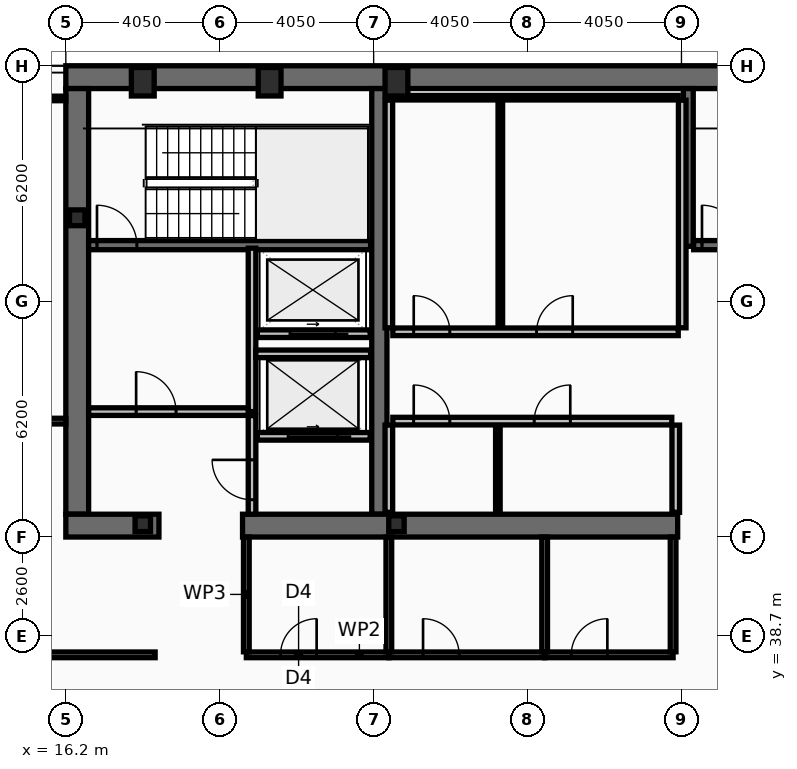
"""IFC4 building model, lengths in metres.
Left out: names, types, materials, properties, quantities, classifications, styles, units other than length and angle.
Written with IfcOpenShell. Run it as: python <this file> out.ifc"""

import sys

from ifc_helpers import new_model, si_unit, direction, frame, frame_2d, origin, origin_2d, place, context, subcontext, project, spatial, rectangle, hollow_rectangle, i_section, extrude, element, fill, save


model = new_model("IFC4")
c1 = context("Model", 3, precision=1e-05, world=origin(), true_north=direction((0.0, 1.0)))
c2 = subcontext(c1, "Body", "Model", "MODEL_VIEW")
j1 = project(units=[si_unit("LENGTHUNIT", "METRE"), si_unit("PLANEANGLEUNIT", "RADIAN")], contexts=[c1])
p1 = place(None, origin())
s1 = spatial("IfcSite", under=j1, at=p1, CompositionType="ELEMENT")
p2 = place(p1, origin())
s2 = spatial("IfcBuilding", under=s1, at=p2, CompositionType="ELEMENT")
p3 = place(p2, frame((0.0, 0.0, 203.0)))
s3 = spatial("IfcBuildingStorey", under=s2, at=p3, CompositionType="ELEMENT", Elevation=203.0)
p4 = place(p3, frame((16.2, 53.4, 0.0), z_axis=(0.0, 0.0, 1.0), x_axis=(1.0, 0.0, 0.0)))
e1 = element("IfcWall", 1, at=p4, inside=s3, PredefinedType="SHEAR", context=c2, shape_type="SweptSolid", body=[
    extrude(rectangle(XDim=40.5, YDim=0.6, at=frame_2d((20.25, 0.0))), origin(), (0.0, 0.0, 1.0), 3.44),
])
p5 = place(p3, frame((16.5, 41.9, 0.0), z_axis=(0.0, 0.0, 1.0), x_axis=(0.0, 1.0, 0.0)))
e2 = element("IfcWall", 2, at=p5, inside=s3, PredefinedType="SHEAR", context=c2, shape_type="SweptSolid", body=[
    extrude(rectangle(XDim=11.2, YDim=0.6, at=frame_2d((5.6, 0.0))), origin(), (0.0, 0.0, 1.0), 3.44),
])
p6 = place(p3, frame((24.45, 41.9, 0.0), z_axis=(0.0, 0.0, 1.0), x_axis=(0.0, 1.0, 0.0)))
e3 = element("IfcWall", 3, at=p6, inside=s3, PredefinedType="SHEAR", context=c2, shape_type="SweptSolid", body=[
    extrude(rectangle(XDim=11.2, YDim=0.4, at=frame_2d((5.6, 0.0))), origin(), (0.0, 0.0, 1.0), 3.44),
])
p7 = place(p3, frame((18.65, 41.6, 0.0), z_axis=(0.0, 0.0, 1.0), x_axis=(-1.0, 0.0, 0.0)))
e4 = element("IfcWall", 4, at=p7, inside=s3, PredefinedType="SHEAR", context=c2, shape_type="SweptSolid", body=[
    extrude(rectangle(XDim=2.45, YDim=0.6, at=frame_2d((1.225, 0.0))), origin(), (0.0, 0.0, 1.0), 3.44),
])
p8 = place(p3, frame((32.3, 41.6, 0.0), z_axis=(0.0, 0.0, 1.0), x_axis=(-1.0, 0.0, 0.0)))
e5 = element("IfcWall", 5, at=p8, inside=s3, PredefinedType="SHEAR", context=c2, shape_type="SweptSolid", body=[
    extrude(rectangle(XDim=11.45, YDim=0.6, at=frame_2d((5.725, 0.0))), origin(), (0.0, 0.0, 1.0), 3.44),
])
p9 = place(p3, frame((32.58, 48.95, 0.0), z_axis=(0.0, 0.0, 1.0), x_axis=(0.0, 1.0, 0.0)))
e6 = element("IfcWall", 6, at=p9, inside=s3, PredefinedType="SHEAR", context=c2, shape_type="SweptSolid", body=[
    extrude(rectangle(XDim=4.15, YDim=0.26, at=frame_2d((2.075, 0.0))), origin(), (0.0, 0.0, 1.0), 3.44),
])
p10 = place(p3, frame((16.8, 48.98, 0.0), z_axis=(0.0, 0.0, 1.0), x_axis=(1.0, 0.0, 0.0)))
e7 = element("IfcWall", 7, at=p10, inside=s3, PredefinedType="SHEAR", context=c2, shape_type="SweptSolid", body=[
    extrude(rectangle(XDim=7.42, YDim=0.24, at=frame_2d((3.71, 0.0))), origin(), (0.0, 0.0, 1.0), 3.44),
])
p11 = place(p10, frame((0.22, 0.0, 0.0)))
e8 = element("IfcOpeningElement", 8, at=p11, cuts=e7, PredefinedType="OPENING", context=c2, shape_type="SweptSolid", body=[
    extrude(rectangle(XDim=1.05, YDim=2.15, at=frame_2d((0.525, 1.075))), frame((0.0, 0.13, 0.0), z_axis=(0.0, -1.0, 0.0), x_axis=(1.0, 0.0, 0.0)), (0.0, 0.0, 1.0), 0.26),
])
p12 = place(p3, frame((32.72, 48.98, 0.0), z_axis=(0.0, 0.0, 1.0), x_axis=(1.0, 0.0, 0.0)))
e9 = element("IfcWall", 9, at=p12, inside=s3, PredefinedType="SHEAR", context=c2, shape_type="SweptSolid", body=[
    extrude(rectangle(XDim=7.56, YDim=0.24, at=frame_2d((3.78, 0.0))), origin(), (0.0, 0.0, 1.0), 3.44),
])
p13 = place(p12, frame((0.22, 0.0, 0.0)))
e10 = element("IfcOpeningElement", 10, at=p13, cuts=e9, PredefinedType="OPENING", context=c2, shape_type="SweptSolid", body=[
    extrude(rectangle(XDim=1.05, YDim=2.15, at=frame_2d((0.525, 1.075))), frame((0.0, 0.13, 0.0), z_axis=(0.0, -1.0, 0.0), x_axis=(1.0, 0.0, 0.0)), (0.0, 0.0, 1.0), 0.26),
])
for number, where, z_axis, x_axis in (
    (11, (18.225, 53.28, 0.0), (0.0, 0.0, 1.0), (1.0, 0.0, 0.0)),
    (12, (21.562, 53.28, 0.0), (0.0, 0.0, 1.0), (1.0, 0.0, 0.0)),
    (13, (24.9, 53.28, 0.0), (0.0, 0.0, 1.0), (1.0, 0.0, 0.0)),
):
    element("IfcColumn", number, at=place(p3, frame(where, z_axis=z_axis, x_axis=x_axis)), inside=s3, PredefinedType="COLUMN", context=c2, shape_type="SweptSolid", body=[
        extrude(hollow_rectangle(XDim=0.6, YDim=0.75, WallThickness=0.045, at=origin_2d()), origin(), (0.0, 0.0, 1.0), 3.6),
    ])
for number, where, z_axis, x_axis in (
    (14, (16.5, 49.7, 0.0), (0.0, 0.0, 1.0), (1.0, 0.0, 0.0)),
    (15, (18.225, 41.65, 0.0), (0.0, 0.0, 1.0), (1.0, 0.0, 0.0)),
    (16, (24.9, 41.65, 0.0), (0.0, 0.0, 1.0), (1.0, 0.0, 0.0)),
):
    element("IfcColumn", number, at=place(p3, frame(where, z_axis=z_axis, x_axis=x_axis)), inside=s3, PredefinedType="COLUMN", context=c2, shape_type="SweptSolid", body=[
        extrude(i_section(OverallWidth=0.406, OverallDepth=0.416, WebThickness=0.03, FlangeThickness=0.048, at=origin_2d()), origin(), (0.0, 0.0, 1.0), 3.6),
    ])
p14 = place(p3, frame((24.21, 43.95, 0.0), z_axis=(0.0, 0.0, 1.0), x_axis=(-1.0, 0.0, 0.0)))
e17 = element("IfcWall", 17, at=p14, inside=s3, PredefinedType="PARTITIONING", context=c2, shape_type="SweptSolid", body=[
    extrude(rectangle(XDim=2.97, YDim=0.2, at=frame_2d((1.485, 0.0))), origin(), (0.0, 0.0, 1.0), 3.44),
])
p15 = place(p14, frame((0.86, 0.0, 0.0)))
e18 = element("IfcOpeningElement", 18, at=p15, cuts=e17, PredefinedType="OPENING", context=c2, shape_type="SweptSolid", body=[
    extrude(rectangle(XDim=1.3, YDim=2.18, at=frame_2d((0.65, 1.09))), frame((0.0, 0.11, 0.0), z_axis=(0.0, -1.0, 0.0), x_axis=(1.0, 0.0, 0.0)), (0.0, 0.0, 1.0), 0.22),
])
p16 = place(p3, frame((24.21, 46.65, 0.0), z_axis=(0.0, 0.0, 1.0), x_axis=(-1.0, 0.0, 0.0)))
e19 = element("IfcWall", 19, at=p16, inside=s3, PredefinedType="PARTITIONING", context=c2, shape_type="SweptSolid", body=[
    extrude(rectangle(XDim=2.97, YDim=0.2, at=frame_2d((1.485, 0.0))), origin(), (0.0, 0.0, 1.0), 3.44),
])
p17 = place(p16, frame((0.91, 0.0, 0.0)))
e20 = element("IfcOpeningElement", 20, at=p17, cuts=e19, PredefinedType="OPENING", context=c2, shape_type="SweptSolid", body=[
    extrude(rectangle(XDim=1.2, YDim=2.18, at=frame_2d((0.6, 1.09))), frame((0.0, 0.11, 0.0), z_axis=(0.0, -1.0, 0.0), x_axis=(1.0, 0.0, 0.0)), (0.0, 0.0, 1.0), 0.22),
])
p18 = place(p3, frame((21.1, 44.6, 0.0), z_axis=(0.0, 0.0, 1.0), x_axis=(0.0, 1.0, 0.0)))
e21 = element("IfcWall", 21, at=p18, inside=s3, PredefinedType="PARTITIONING", context=c2, shape_type="SweptSolid", body=[
    extrude(rectangle(XDim=4.3, YDim=0.2, at=frame_2d((2.15, 0.0))), origin(), (0.0, 0.0, 1.0), 3.44),
])
p19 = place(p3, frame((16.8, 44.6, 0.0), z_axis=(0.0, 0.0, 1.0), x_axis=(1.0, 0.0, 0.0)))
e22 = element("IfcWall", 22, at=p19, inside=s3, PredefinedType="PARTITIONING", context=c2, shape_type="SweptSolid", body=[
    extrude(rectangle(XDim=4.2, YDim=0.2, at=frame_2d((2.1, 0.0))), origin(), (0.0, 0.0, 1.0), 3.44),
])
p20 = place(p19, frame((1.25, 0.0, 0.0)))
e23 = element("IfcOpeningElement", 23, at=p20, cuts=e22, PredefinedType="OPENING", context=c2, shape_type="SweptSolid", body=[
    extrude(rectangle(XDim=1.05, YDim=2.15, at=frame_2d((0.525, 1.075))), frame((0.0, 0.11, 0.0), z_axis=(0.0, -1.0, 0.0), x_axis=(1.0, 0.0, 0.0)), (0.0, 0.0, 1.0), 0.22),
])
p21 = place(p3, frame((21.2, 46.12, 0.0), z_axis=(0.0, 0.0, 1.0), x_axis=(1.0, 0.0, 0.0)))
e24 = element("IfcWall", 24, at=p21, inside=s3, PredefinedType="PARTITIONING", context=c2, shape_type="SweptSolid", body=[
    extrude(rectangle(XDim=3.02, YDim=0.2, at=frame_2d((1.51, 0.0))), origin(), (0.0, 0.0, 1.0), 3.44),
])
p22 = place(p3, frame((21.1, 41.9, 0.0), z_axis=(0.0, 0.0, 1.0), x_axis=(0.0, 1.0, 0.0)))
e25 = element("IfcWall", 25, at=p22, inside=s3, PredefinedType="PARTITIONING", context=c2, shape_type="SweptSolid", body=[
    extrude(rectangle(XDim=2.595, YDim=0.2, at=frame_2d((1.298, 0.0))), origin(), (0.0, 0.0, 1.0), 3.44),
])
p23 = place(p22, frame((0.38, 0.0, 0.0)))
e26 = element("IfcOpeningElement", 26, at=p23, cuts=e25, PredefinedType="OPENING", context=c2, shape_type="SweptSolid", body=[
    extrude(rectangle(XDim=1.05, YDim=2.15, at=frame_2d((0.525, 1.075))), frame((0.0, 0.11, 0.0), z_axis=(0.0, -1.0, 0.0), x_axis=(1.0, 0.0, 0.0)), (0.0, 0.0, 1.0), 0.22),
])
for number, where, z_axis, x_axis in (
    (27, (24.7, 46.805, 0.0), (0.0, 0.0, 1.0), (0.0, 1.0, 0.0)),
    (28, (32.42, 46.805, 0.0), (0.0, 0.0, 1.0), (0.0, 1.0, 0.0)),
):
    element("IfcWall", number, at=place(p3, frame(where, z_axis=z_axis, x_axis=x_axis)), inside=s3, PredefinedType="PARTITIONING", context=c2, shape_type="SweptSolid", body=[
        extrude(rectangle(XDim=5.99, YDim=0.2, at=frame_2d((2.995, 0.0))), origin(), (0.0, 0.0, 1.0), 3.44),
    ])
p24 = place(p3, frame((24.805, 52.86, 0.0), z_axis=(0.0, 0.0, 1.0), x_axis=(1.0, 0.0, 0.0)))
e29 = element("IfcWall", 29, at=p24, inside=s3, PredefinedType="PARTITIONING", context=c2, shape_type="SweptSolid", body=[
    extrude(rectangle(XDim=7.51, YDim=0.12, at=frame_2d((3.755, 0.0))), origin(), (0.0, 0.0, 1.0), 3.44),
])
p25 = place(p3, frame((27.634, 46.805, 0.0), z_axis=(0.0, 0.0, 1.0), x_axis=(0.0, 1.0, 0.0)))
e30 = element("IfcWall", 30, at=p25, inside=s3, PredefinedType="PARTITIONING", context=c2, shape_type="SweptSolid", body=[
    extrude(rectangle(XDim=5.99, YDim=0.12, at=frame_2d((2.995, 0.0))), origin(), (0.0, 0.0, 1.0), 3.44),
])
p26 = place(p3, frame((24.805, 46.7, 0.0), z_axis=(0.0, 0.0, 1.0), x_axis=(1.0, 0.0, 0.0)))
e31 = element("IfcWall", 31, at=p26, inside=s3, PredefinedType="PARTITIONING", context=c2, shape_type="SweptSolid", body=[
    extrude(rectangle(XDim=7.51, YDim=0.2, at=frame_2d((3.755, 0.0))), origin(), (0.0, 0.0, 1.0), 3.44),
])
p27 = place(p26, frame((0.55, 0.0, 0.0)))
e32 = element("IfcOpeningElement", 32, at=p27, cuts=e31, PredefinedType="OPENING", context=c2, shape_type="SweptSolid", body=[
    extrude(rectangle(XDim=0.95, YDim=2.1, at=frame_2d((0.475, 1.05))), frame((0.0, 0.11, 0.0), z_axis=(0.0, -1.0, 0.0), x_axis=(1.0, 0.0, 0.0)), (0.0, 0.0, 1.0), 0.22),
])
p28 = place(p26, frame((3.784, 0.0, 0.0)))
e33 = element("IfcOpeningElement", 33, at=p28, cuts=e31, PredefinedType="OPENING", context=c2, shape_type="SweptSolid", body=[
    extrude(rectangle(XDim=0.95, YDim=2.1, at=frame_2d((0.475, 1.05))), frame((0.0, 0.11, 0.0), z_axis=(0.0, -1.0, 0.0), x_axis=(1.0, 0.0, 0.0)), (0.0, 0.0, 1.0), 0.22),
])
for number, where, z_axis, x_axis in (
    (34, (24.7, 41.95, 0.0), (0.0, 0.0, 1.0), (0.0, 1.0, 0.0)),
    (35, (32.25, 41.95, 0.0), (0.0, 0.0, 1.0), (0.0, 1.0, 0.0)),
):
    element("IfcWall", number, at=place(p3, frame(where, z_axis=z_axis, x_axis=x_axis)), inside=s3, PredefinedType="PARTITIONING", context=c2, shape_type="SweptSolid", body=[
        extrude(rectangle(XDim=2.295, YDim=0.2, at=frame_2d((1.147, 0.0))), origin(), (0.0, 0.0, 1.0), 3.44),
    ])
p29 = place(p3, frame((27.569, 41.95, 0.0), z_axis=(0.0, 0.0, 1.0), x_axis=(0.0, 1.0, 0.0)))
e36 = element("IfcWall", 36, at=p29, inside=s3, PredefinedType="PARTITIONING", context=c2, shape_type="SweptSolid", body=[
    extrude(rectangle(XDim=2.295, YDim=0.12, at=frame_2d((1.147, 0.0))), origin(), (0.0, 0.0, 1.0), 3.44),
])
p30 = place(p3, frame((24.805, 44.35, 0.0), z_axis=(0.0, 0.0, 1.0), x_axis=(1.0, 0.0, 0.0)))
e37 = element("IfcWall", 37, at=p30, inside=s3, PredefinedType="PARTITIONING", context=c2, shape_type="SweptSolid", body=[
    extrude(rectangle(XDim=7.34, YDim=0.2, at=frame_2d((3.67, 0.0))), origin(), (0.0, 0.0, 1.0), 3.44),
])
p31 = place(p30, frame((0.55, 0.0, 0.0)))
e38 = element("IfcOpeningElement", 38, at=p31, cuts=e37, PredefinedType="OPENING", context=c2, shape_type="SweptSolid", body=[
    extrude(rectangle(XDim=0.95, YDim=2.1, at=frame_2d((0.475, 1.05))), frame((0.0, 0.11, 0.0), z_axis=(0.0, -1.0, 0.0), x_axis=(1.0, 0.0, 0.0)), (0.0, 0.0, 1.0), 0.22),
])
p32 = place(p30, frame((3.719, 0.0, 0.0)))
e39 = element("IfcOpeningElement", 39, at=p32, cuts=e37, PredefinedType="OPENING", context=c2, shape_type="SweptSolid", body=[
    extrude(rectangle(XDim=0.95, YDim=2.1, at=frame_2d((0.475, 1.05))), frame((0.0, 0.11, 0.0), z_axis=(0.0, -1.0, 0.0), x_axis=(1.0, 0.0, 0.0)), (0.0, 0.0, 1.0), 0.22),
])
p33 = place(p3, frame((20.95, 38.2, 0.0), z_axis=(0.0, 0.0, 1.0), x_axis=(1.0, 0.0, 0.0)))
e40 = element("IfcWall", 40, at=p33, inside=s3, PredefinedType="PARTITIONING", context=c2, shape_type="SweptSolid", body=[
    extrude(rectangle(XDim=3.75, YDim=0.15, at=frame_2d((1.875, 0.0))), origin(), (0.0, 0.0, 1.0), 2.73),
])
p34 = place(p33, frame((0.9, 0.0, 0.0)))
e41 = element("IfcOpeningElement", 41, at=p34, cuts=e40, PredefinedType="OPENING", context=c2, shape_type="SweptSolid", body=[
    extrude(rectangle(XDim=0.95, YDim=2.05, at=frame_2d((0.475, 1.025))), frame((0.0, 0.085, 0.0), z_axis=(0.0, -1.0, 0.0), x_axis=(1.0, 0.0, 0.0)), (0.0, 0.0, 1.0), 0.17),
])
p35 = place(p3, frame((24.7, 38.2, 0.0), z_axis=(0.0, 0.0, 1.0), x_axis=(1.0, 0.0, 0.0)))
e42 = element("IfcWall", 42, at=p35, inside=s3, PredefinedType="PARTITIONING", context=c2, shape_type="SweptSolid", body=[
    extrude(rectangle(XDim=4.1, YDim=0.15, at=frame_2d((2.05, 0.0))), origin(), (0.0, 0.0, 1.0), 2.73),
])
p36 = place(p35, frame((0.9, 0.0, 0.0)))
e43 = element("IfcOpeningElement", 43, at=p36, cuts=e42, PredefinedType="OPENING", context=c2, shape_type="SweptSolid", body=[
    extrude(rectangle(XDim=0.95, YDim=2.05, at=frame_2d((0.475, 1.025))), frame((0.0, 0.085, 0.0), z_axis=(0.0, -1.0, 0.0), x_axis=(1.0, 0.0, 0.0)), (0.0, 0.0, 1.0), 0.17),
])
p37 = place(p3, frame((28.8, 38.2, 0.0), z_axis=(0.0, 0.0, 1.0), x_axis=(1.0, 0.0, 0.0)))
e44 = element("IfcWall", 44, at=p37, inside=s3, PredefinedType="PARTITIONING", context=c2, shape_type="SweptSolid", body=[
    extrude(rectangle(XDim=3.38, YDim=0.15, at=frame_2d((1.69, 0.0))), origin(), (0.0, 0.0, 1.0), 2.73),
])
p38 = place(p37, frame((0.7, 0.0, 0.0)))
e45 = element("IfcOpeningElement", 45, at=p38, cuts=e44, PredefinedType="OPENING", context=c2, shape_type="SweptSolid", body=[
    extrude(rectangle(XDim=0.95, YDim=2.05, at=frame_2d((0.475, 1.025))), frame((0.0, 0.085, 0.0), z_axis=(0.0, -1.0, 0.0), x_axis=(1.0, 0.0, 0.0)), (0.0, 0.0, 1.0), 0.17),
])
p39 = place(p3, frame((20.95, 38.28, 0.0), z_axis=(0.0, 0.0, 1.0), x_axis=(0.0, 1.0, 0.0)))
e46 = element("IfcWall", 46, at=p39, inside=s3, PredefinedType="PARTITIONING", context=c2, shape_type="SweptSolid", body=[
    extrude(rectangle(XDim=3.02, YDim=0.15, at=frame_2d((1.51, 0.0))), origin(), (0.0, 0.0, 1.0), 3.44),
])
p40 = place(p3, frame((24.7, 38.28, 0.0), z_axis=(0.0, 0.0, 1.0), x_axis=(0.0, 1.0, 0.0)))
e47 = element("IfcWall", 47, at=p40, inside=s3, PredefinedType="PARTITIONING", context=c2, shape_type="SweptSolid", body=[
    extrude(rectangle(XDim=3.02, YDim=0.15, at=frame_2d((1.51, 0.0))), origin(), (0.0, 0.0, 1.0), 2.73),
])
for number, where, z_axis, x_axis in (
    (48, (28.8, 38.28, 0.0), (0.0, 0.0, 1.0), (0.0, 1.0, 0.0)),
    (49, (32.18, 38.28, 0.0), (0.0, 0.0, 1.0), (0.0, 1.0, 0.0)),
):
    element("IfcWall", number, at=place(p3, frame(where, z_axis=z_axis, x_axis=x_axis)), inside=s3, PredefinedType="PARTITIONING", context=c2, shape_type="SweptSolid", body=[
        extrude(rectangle(XDim=3.02, YDim=0.15, at=frame_2d((1.51, 0.0))), origin(), (0.0, 0.0, 1.0), 3.44),
    ])
p41 = place(p3, frame((8.03, 38.2, 0.0), z_axis=(0.0, 0.0, 1.0), x_axis=(1.0, 0.0, 0.0)))
e50 = element("IfcWall", 50, at=p41, inside=s3, PredefinedType="PARTITIONING", context=c2, shape_type="SweptSolid", body=[
    extrude(rectangle(XDim=10.52, YDim=0.15, at=frame_2d((5.26, 0.0))), origin(), (0.0, 0.0, 1.0), 2.73),
])
p42 = place(p41, frame((6.32, 0.0, 0.0)))
e51 = element("IfcOpeningElement", 51, at=p42, cuts=e50, PredefinedType="OPENING", context=c2, shape_type="SweptSolid", body=[
    extrude(rectangle(XDim=0.95, YDim=2.05, at=frame_2d((0.475, 1.025))), frame((0.0, 0.085, 0.0), z_axis=(0.0, -1.0, 0.0), x_axis=(1.0, 0.0, 0.0)), (0.0, 0.0, 1.0), 0.17),
])
p43 = place(p3, frame((8.095, 44.35, 0.0), z_axis=(0.0, 0.0, 1.0), x_axis=(1.0, 0.0, 0.0)))
e52 = element("IfcWall", 52, at=p43, inside=s3, PredefinedType="PARTITIONING", context=c2, shape_type="SweptSolid", body=[
    extrude(rectangle(XDim=8.105, YDim=0.15, at=frame_2d((4.052, 0.0))), origin(), (0.0, 0.0, 1.0), 2.83),
])
p44 = place(p43, frame((6.32, 0.0, 0.0)))
e53 = element("IfcOpeningElement", 53, at=p44, cuts=e52, PredefinedType="OPENING", context=c2, shape_type="SweptSolid", body=[
    extrude(rectangle(XDim=0.9, YDim=2.05, at=frame_2d((0.45, 1.025))), frame((0.0, 0.085, 0.0), z_axis=(0.0, -1.0, 0.0), x_axis=(1.0, 0.0, 0.0)), (0.0, 0.0, 1.0), 0.17),
])
p45 = place(p3, frame((8.095, 52.84, 0.0), z_axis=(0.0, 0.0, 1.0), x_axis=(1.0, 0.0, 0.0)))
e54 = element("IfcWall", 54, at=p45, inside=s3, PredefinedType="PARTITIONING", context=c2, shape_type="SweptSolid", body=[
    extrude(rectangle(XDim=8.105, YDim=0.12, at=frame_2d((4.052, 0.0))), origin(), (0.0, 0.0, 1.0), 3.44),
])
p46 = place(p11, origin())
e55 = element("IfcDoor", 55, at=p46, inside=s3, OperationType="SINGLE_SWING_LEFT", PredefinedType="DOOR", context=c2, shape_type="SweptSolid", body=[
    extrude(rectangle(XDim=1.05, YDim=2.15, at=frame_2d((0.525, 1.075))), frame((0.0, 0.025, 0.0), z_axis=(0.0, -1.0, 0.0), x_axis=(1.0, 0.0, 0.0)), (0.0, 0.0, 1.0), 0.05),
])
fill(e8, e55)
p47 = place(p13, origin())
e56 = element("IfcDoor", 56, at=p47, inside=s3, OperationType="SINGLE_SWING_LEFT", PredefinedType="DOOR", context=c2, shape_type="SweptSolid", body=[
    extrude(rectangle(XDim=1.05, YDim=2.15, at=frame_2d((0.525, 1.075))), frame((0.0, 0.025, 0.0), z_axis=(0.0, -1.0, 0.0), x_axis=(1.0, 0.0, 0.0)), (0.0, 0.0, 1.0), 0.05),
])
fill(e10, e56)
p48 = place(p15, origin())
e57 = element("IfcDoor", 57, at=p48, inside=s3, OperationType="SLIDING_TO_LEFT", PredefinedType="DOOR", context=c2, shape_type="SweptSolid", body=[
    extrude(rectangle(XDim=1.3, YDim=2.18, at=frame_2d((0.65, 1.09))), frame((0.0, 0.025, 0.0), z_axis=(0.0, -1.0, 0.0), x_axis=(1.0, 0.0, 0.0)), (0.0, 0.0, 1.0), 0.05),
])
fill(e18, e57)
p49 = place(p17, origin())
e58 = element("IfcDoor", 58, at=p49, inside=s3, OperationType="SLIDING_TO_LEFT", PredefinedType="DOOR", context=c2, shape_type="SweptSolid", body=[
    extrude(rectangle(XDim=1.2, YDim=2.18, at=frame_2d((0.6, 1.09))), frame((0.0, 0.025, 0.0), z_axis=(0.0, -1.0, 0.0), x_axis=(1.0, 0.0, 0.0)), (0.0, 0.0, 1.0), 0.05),
])
fill(e20, e58)
p50 = place(p20, origin())
e59 = element("IfcDoor", 59, at=p50, inside=s3, OperationType="SINGLE_SWING_LEFT", PredefinedType="DOOR", context=c2, shape_type="SweptSolid", body=[
    extrude(rectangle(XDim=1.05, YDim=2.15, at=frame_2d((0.525, 1.075))), frame((0.0, 0.025, 0.0), z_axis=(0.0, -1.0, 0.0), x_axis=(1.0, 0.0, 0.0)), (0.0, 0.0, 1.0), 0.05),
])
fill(e23, e59)
p51 = place(p23, origin())
e60 = element("IfcDoor", 60, at=p51, inside=s3, OperationType="SINGLE_SWING_RIGHT", PredefinedType="DOOR", context=c2, shape_type="SweptSolid", body=[
    extrude(rectangle(XDim=1.05, YDim=2.15, at=frame_2d((0.525, 1.075))), frame((0.0, 0.025, 0.0), z_axis=(0.0, -1.0, 0.0), x_axis=(1.0, 0.0, 0.0)), (0.0, 0.0, 1.0), 0.05),
])
fill(e26, e60)
p52 = place(p27, origin())
e61 = element("IfcDoor", 61, at=p52, inside=s3, OperationType="SINGLE_SWING_LEFT", PredefinedType="DOOR", context=c2, shape_type="SweptSolid", body=[
    extrude(rectangle(XDim=0.95, YDim=2.1, at=frame_2d((0.475, 1.05))), frame((0.0, 0.025, 0.0), z_axis=(0.0, -1.0, 0.0), x_axis=(1.0, 0.0, 0.0)), (0.0, 0.0, 1.0), 0.05),
])
fill(e32, e61)
p53 = place(p28, origin())
e62 = element("IfcDoor", 62, at=p53, inside=s3, OperationType="SINGLE_SWING_RIGHT", PredefinedType="DOOR", context=c2, shape_type="SweptSolid", body=[
    extrude(rectangle(XDim=0.95, YDim=2.1, at=frame_2d((0.475, 1.05))), frame((0.0, 0.025, 0.0), z_axis=(0.0, -1.0, 0.0), x_axis=(1.0, 0.0, 0.0)), (0.0, 0.0, 1.0), 0.05),
])
fill(e33, e62)
p54 = place(p31, origin())
e63 = element("IfcDoor", 63, at=p54, inside=s3, OperationType="SINGLE_SWING_LEFT", PredefinedType="DOOR", context=c2, shape_type="SweptSolid", body=[
    extrude(rectangle(XDim=0.95, YDim=2.1, at=frame_2d((0.475, 1.05))), frame((0.0, 0.025, 0.0), z_axis=(0.0, -1.0, 0.0), x_axis=(1.0, 0.0, 0.0)), (0.0, 0.0, 1.0), 0.05),
])
fill(e38, e63)
p55 = place(p32, origin())
e64 = element("IfcDoor", 64, at=p55, inside=s3, OperationType="SINGLE_SWING_RIGHT", PredefinedType="DOOR", context=c2, shape_type="SweptSolid", body=[
    extrude(rectangle(XDim=0.95, YDim=2.1, at=frame_2d((0.475, 1.05))), frame((0.0, 0.025, 0.0), z_axis=(0.0, -1.0, 0.0), x_axis=(1.0, 0.0, 0.0)), (0.0, 0.0, 1.0), 0.05),
])
fill(e39, e64)
p56 = place(p34, origin())
e65 = element("IfcDoor", 65, at=p56, inside=s3, OperationType="SINGLE_SWING_RIGHT", PredefinedType="DOOR", context=c2, shape_type="SweptSolid", body=[
    extrude(rectangle(XDim=0.95, YDim=2.05, at=frame_2d((0.475, 1.025))), frame((0.0, 0.025, 0.0), z_axis=(0.0, -1.0, 0.0), x_axis=(1.0, 0.0, 0.0)), (0.0, 0.0, 1.0), 0.05),
])
fill(e41, e65)
p57 = place(p36, origin())
e66 = element("IfcDoor", 66, at=p57, inside=s3, OperationType="SINGLE_SWING_LEFT", PredefinedType="DOOR", context=c2, shape_type="SweptSolid", body=[
    extrude(rectangle(XDim=0.95, YDim=2.05, at=frame_2d((0.475, 1.025))), frame((0.0, 0.025, 0.0), z_axis=(0.0, -1.0, 0.0), x_axis=(1.0, 0.0, 0.0)), (0.0, 0.0, 1.0), 0.05),
])
fill(e43, e66)
p58 = place(p38, origin())
e67 = element("IfcDoor", 67, at=p58, inside=s3, OperationType="SINGLE_SWING_RIGHT", PredefinedType="DOOR", context=c2, shape_type="SweptSolid", body=[
    extrude(rectangle(XDim=0.95, YDim=2.05, at=frame_2d((0.475, 1.025))), frame((0.0, 0.025, 0.0), z_axis=(0.0, -1.0, 0.0), x_axis=(1.0, 0.0, 0.0)), (0.0, 0.0, 1.0), 0.05),
])
fill(e45, e67)
save(model, sys.argv[1])
